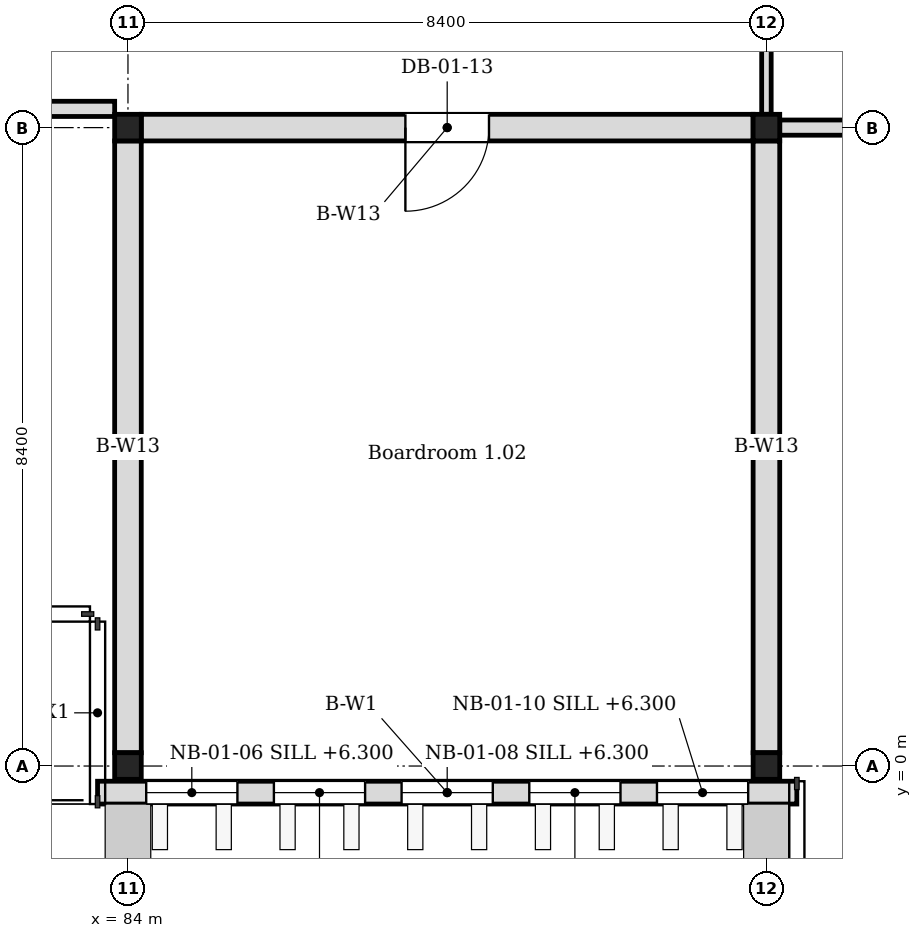
"""IFC4 building model, lengths in metres.
Left out: names, types, materials, properties, quantities, classifications, styles, units other than length and angle.
Written with IfcOpenShell. Run it as: python <this file> out.ifc"""

import sys

from ifc_helpers import new_model, si_unit, direction, frame, frame_2d, origin, origin_2d, place, context, subcontext, project, spatial, rectangle, i_section, extrude, element, fill, save


model = new_model("IFC4")
c1 = context("Model", 3, precision=1e-05, world=origin(), true_north=direction((0.0, 1.0)))
c2 = subcontext(c1, "Body", "Model", "MODEL_VIEW")
j1 = project(units=[si_unit("LENGTHUNIT", "METRE"), si_unit("PLANEANGLEUNIT", "RADIAN")], contexts=[c1])
p1 = place(None, origin())
s1 = spatial("IfcSite", under=j1, at=p1, CompositionType="ELEMENT")
p2 = place(p1, origin())
s2 = spatial("IfcBuilding", under=s1, at=p2, CompositionType="ELEMENT")
p3 = place(p2, frame((0.0, 0.0, 6.0)))
s3 = spatial("IfcBuildingStorey", under=s2, at=p3, CompositionType="ELEMENT", Elevation=6.0)
p4 = place(p3, frame((84.0, 0.0, 0.0), z_axis=(0.0, 0.0, 1.0), x_axis=(1.0, 0.0, 0.0)))
e1 = element("IfcColumn", 1, at=p4, inside=s3, PredefinedType="COLUMN", context=c2, shape_type="SweptSolid", body=[
    extrude(i_section(OverallWidth=0.35, OverallDepth=0.35, WebThickness=0.012, FlangeThickness=0.019, FilletRadius=0.013, at=origin_2d()), origin(), (0.0, 0.0, 1.0), 4.2),
])
p5 = place(p3, frame((84.0, 8.4, -0.15), z_axis=(0.0, 0.0, 1.0), x_axis=(1.0, 0.0, 0.0)))
e2 = element("IfcColumn", 2, at=p5, inside=s3, PredefinedType="COLUMN", context=c2, shape_type="SweptSolid", body=[
    extrude(i_section(OverallWidth=0.35, OverallDepth=0.35, WebThickness=0.012, FlangeThickness=0.019, FilletRadius=0.013, at=origin_2d()), origin(), (0.0, 0.0, 1.0), 4.35),
])
for number, where, z_axis, x_axis in (
    (3, (92.4, 0.0, 0.0), (0.0, 0.0, 1.0), (1.0, 0.0, 0.0)),
    (4, (92.4, 8.4, 0.0), (0.0, 0.0, 1.0), (1.0, 0.0, 0.0)),
):
    element("IfcColumn", number, at=place(p3, frame(where, z_axis=z_axis, x_axis=x_axis)), inside=s3, PredefinedType="COLUMN", context=c2, shape_type="SweptSolid", body=[
        extrude(i_section(OverallWidth=0.35, OverallDepth=0.35, WebThickness=0.012, FlangeThickness=0.019, FilletRadius=0.013, at=origin_2d()), origin(), (0.0, 0.0, 1.0), 4.2),
    ])
p6 = place(p3, frame((83.6, -0.35, 0.0), z_axis=(0.0, 0.0, 1.0), x_axis=(1.0, 0.0, 0.0)))
e5 = element("IfcWall", 5, at=p6, inside=s3, PredefinedType="SOLIDWALL", context=c2, shape_type="SweptSolid", body=[
    extrude(rectangle(XDim=9.2, YDim=0.3, at=frame_2d((4.6, 0.0))), origin(), (0.0, 0.0, 1.0), 4.05),
])
p7 = place(p6, frame((0.64, 0.0, 0.3)))
e6 = element("IfcOpeningElement", 6, at=p7, cuts=e5, PredefinedType="OPENING", context=c2, shape_type="SweptSolid", body=[
    extrude(rectangle(XDim=1.2, YDim=3.3, at=frame_2d((0.6, 1.65))), frame((0.0, 0.16, 0.0), z_axis=(0.0, -1.0, 0.0), x_axis=(1.0, 0.0, 0.0)), (0.0, 0.0, 1.0), 0.32),
])
p8 = place(p6, frame((2.32, 0.0, 0.3)))
e7 = element("IfcOpeningElement", 7, at=p8, cuts=e5, PredefinedType="OPENING", context=c2, shape_type="SweptSolid", body=[
    extrude(rectangle(XDim=1.2, YDim=3.3, at=frame_2d((0.6, 1.65))), frame((0.0, 0.16, 0.0), z_axis=(0.0, -1.0, 0.0), x_axis=(1.0, 0.0, 0.0)), (0.0, 0.0, 1.0), 0.32),
])
p9 = place(p6, frame((4.0, 0.0, 0.3)))
e8 = element("IfcOpeningElement", 8, at=p9, cuts=e5, PredefinedType="OPENING", context=c2, shape_type="SweptSolid", body=[
    extrude(rectangle(XDim=1.2, YDim=3.3, at=frame_2d((0.6, 1.65))), frame((0.0, 0.16, 0.0), z_axis=(0.0, -1.0, 0.0), x_axis=(1.0, 0.0, 0.0)), (0.0, 0.0, 1.0), 0.32),
])
p10 = place(p6, frame((5.68, 0.0, 0.3)))
e9 = element("IfcOpeningElement", 9, at=p10, cuts=e5, PredefinedType="OPENING", context=c2, shape_type="SweptSolid", body=[
    extrude(rectangle(XDim=1.2, YDim=3.3, at=frame_2d((0.6, 1.65))), frame((0.0, 0.16, 0.0), z_axis=(0.0, -1.0, 0.0), x_axis=(1.0, 0.0, 0.0)), (0.0, 0.0, 1.0), 0.32),
])
p11 = place(p6, frame((7.36, 0.0, 0.3)))
e10 = element("IfcOpeningElement", 10, at=p11, cuts=e5, PredefinedType="OPENING", context=c2, shape_type="SweptSolid", body=[
    extrude(rectangle(XDim=1.2, YDim=3.3, at=frame_2d((0.6, 1.65))), frame((0.0, 0.16, 0.0), z_axis=(0.0, -1.0, 0.0), x_axis=(1.0, 0.0, 0.0)), (0.0, 0.0, 1.0), 0.32),
])
p12 = place(p3, frame((75.775, 8.646, 0.0), z_axis=(0.0, 0.0, 1.0), x_axis=(1.0, 0.0, 0.0)))
e11 = element("IfcWall", 11, at=p12, inside=s3, PredefinedType="PARTITIONING", context=c2, shape_type="SweptSolid", body=[
    extrude(rectangle(XDim=8.05, YDim=0.2, at=frame_2d((4.025, 0.0))), origin(), (0.0, 0.0, 1.0), 3.35),
])
p13 = place(p12, frame((0.825, 0.0, 0.0)))
e12 = element("IfcOpeningElement", 12, at=p13, cuts=e11, PredefinedType="OPENING", context=c2, shape_type="SweptSolid", body=[
    extrude(rectangle(XDim=1.0, YDim=2.1, at=frame_2d((0.5, 1.05))), frame((0.0, 0.11, 0.0), z_axis=(0.0, -1.0, 0.0), x_axis=(1.0, 0.0, 0.0)), (0.0, 0.0, 1.0), 0.22),
])
p14 = place(p3, frame((84.175, 8.4, 0.0), z_axis=(0.0, 0.0, 1.0), x_axis=(1.0, 0.0, 0.0)))
e13 = element("IfcWall", 13, at=p14, inside=s3, PredefinedType="PARTITIONING", context=c2, shape_type="SweptSolid", body=[
    extrude(rectangle(XDim=8.05, YDim=0.35, at=frame_2d((4.025, 0.0))), origin(), (0.0, 0.0, 1.0), 3.35),
])
p15 = place(p14, frame((3.475, 0.0, 0.0)))
e14 = element("IfcOpeningElement", 14, at=p15, cuts=e13, PredefinedType="OPENING", context=c2, shape_type="SweptSolid", body=[
    extrude(rectangle(XDim=1.1, YDim=2.4, at=frame_2d((0.55, 1.2))), frame((0.0, 0.185, 0.0), z_axis=(0.0, -1.0, 0.0), x_axis=(1.0, 0.0, 0.0)), (0.0, 0.0, 1.0), 0.37),
])
p16 = place(p3, frame((92.575, 8.4, 0.0), z_axis=(0.0, 0.0, 1.0), x_axis=(1.0, 0.0, 0.0)))
e15 = element("IfcWall", 15, at=p16, inside=s3, PredefinedType="PARTITIONING", context=c2, shape_type="SweptSolid", body=[
    extrude(rectangle(XDim=8.05, YDim=0.2, at=frame_2d((4.025, 0.0))), origin(), (0.0, 0.0, 1.0), 3.35),
])
p17 = place(p16, frame((2.825, 0.0, 0.0)))
e16 = element("IfcOpeningElement", 16, at=p17, cuts=e15, PredefinedType="OPENING", context=c2, shape_type="SweptSolid", body=[
    extrude(rectangle(XDim=2.4, YDim=2.2, at=frame_2d((1.2, 1.1))), frame((0.0, 0.11, 0.0), z_axis=(0.0, -1.0, 0.0), x_axis=(1.0, 0.0, 0.0)), (0.0, 0.0, 1.0), 0.22),
])
for number, where, z_axis, x_axis in (
    (17, (84.0, 0.175, 0.0), (0.0, 0.0, 1.0), (0.0, 1.0, 0.0)),
    (18, (92.4, 0.175, 0.0), (0.0, 0.0, 1.0), (0.0, 1.0, 0.0)),
):
    element("IfcWall", number, at=place(p3, frame(where, z_axis=z_axis, x_axis=x_axis)), inside=s3, PredefinedType="PARTITIONING", context=c2, shape_type="SweptSolid", body=[
        extrude(rectangle(XDim=8.05, YDim=0.35, at=frame_2d((4.025, 0.0))), origin(), (0.0, 0.0, 1.0), 3.35),
    ])
p18 = place(p3, frame((92.4, 8.575, 0.0), z_axis=(0.0, 0.0, 1.0), x_axis=(0.0, 1.0, 0.0)))
e19 = element("IfcWall", 19, at=p18, inside=s3, PredefinedType="PARTITIONING", context=c2, shape_type="SweptSolid", body=[
    extrude(rectangle(XDim=8.05, YDim=0.125, at=frame_2d((4.025, 0.0))), origin(), (0.0, 0.0, 1.0), 3.35),
])
p19 = place(p18, frame((2.825, 0.0, 0.0)))
e20 = element("IfcOpeningElement", 20, at=p19, cuts=e19, PredefinedType="OPENING", context=c2, shape_type="SweptSolid", body=[
    extrude(rectangle(XDim=2.4, YDim=2.2, at=frame_2d((1.2, 1.1))), frame((0.0, 0.073, 0.0), z_axis=(0.0, -1.0, 0.0), x_axis=(1.0, 0.0, 0.0)), (0.0, 0.0, 1.0), 0.145),
])
p20 = place(p7, origin())
e21 = element("IfcWindow", 21, at=p20, inside=s3, PartitioningType="TRIPLE_PANEL_VERTICAL", PredefinedType="WINDOW", context=c2, shape_type="SweptSolid", body=[
    extrude(rectangle(XDim=1.2, YDim=3.3, at=frame_2d((0.6, 1.65))), frame((0.0, 0.03, 0.0), z_axis=(0.0, -1.0, 0.0), x_axis=(1.0, 0.0, 0.0)), (0.0, 0.0, 1.0), 0.06),
])
fill(e6, e21)
p21 = place(p8, origin())
e22 = element("IfcWindow", 22, at=p21, inside=s3, PartitioningType="TRIPLE_PANEL_VERTICAL", PredefinedType="WINDOW", context=c2, shape_type="SweptSolid", body=[
    extrude(rectangle(XDim=1.2, YDim=3.3, at=frame_2d((0.6, 1.65))), frame((0.0, 0.03, 0.0), z_axis=(0.0, -1.0, 0.0), x_axis=(1.0, 0.0, 0.0)), (0.0, 0.0, 1.0), 0.06),
])
fill(e7, e22)
p22 = place(p9, origin())
e23 = element("IfcWindow", 23, at=p22, inside=s3, PartitioningType="TRIPLE_PANEL_VERTICAL", PredefinedType="WINDOW", context=c2, shape_type="SweptSolid", body=[
    extrude(rectangle(XDim=1.2, YDim=3.3, at=frame_2d((0.6, 1.65))), frame((0.0, 0.03, 0.0), z_axis=(0.0, -1.0, 0.0), x_axis=(1.0, 0.0, 0.0)), (0.0, 0.0, 1.0), 0.06),
])
fill(e8, e23)
p23 = place(p10, origin())
e24 = element("IfcWindow", 24, at=p23, inside=s3, PartitioningType="TRIPLE_PANEL_VERTICAL", PredefinedType="WINDOW", context=c2, shape_type="SweptSolid", body=[
    extrude(rectangle(XDim=1.2, YDim=3.3, at=frame_2d((0.6, 1.65))), frame((0.0, 0.03, 0.0), z_axis=(0.0, -1.0, 0.0), x_axis=(1.0, 0.0, 0.0)), (0.0, 0.0, 1.0), 0.06),
])
fill(e9, e24)
p24 = place(p11, origin())
e25 = element("IfcWindow", 25, at=p24, inside=s3, PartitioningType="TRIPLE_PANEL_VERTICAL", PredefinedType="WINDOW", context=c2, shape_type="SweptSolid", body=[
    extrude(rectangle(XDim=1.2, YDim=3.3, at=frame_2d((0.6, 1.65))), frame((0.0, 0.03, 0.0), z_axis=(0.0, -1.0, 0.0), x_axis=(1.0, 0.0, 0.0)), (0.0, 0.0, 1.0), 0.06),
])
fill(e10, e25)
p25 = place(p15, origin())
e26 = element("IfcDoor", 26, at=p25, inside=s3, OperationType="SINGLE_SWING_LEFT", PredefinedType="DOOR", context=c2, shape_type="SweptSolid", body=[
    extrude(rectangle(XDim=1.1, YDim=2.4, at=frame_2d((0.55, 1.2))), frame((0.0, 0.025, 0.0), z_axis=(0.0, -1.0, 0.0), x_axis=(1.0, 0.0, 0.0)), (0.0, 0.0, 1.0), 0.05),
])
fill(e14, e26)
save(model, sys.argv[1])
